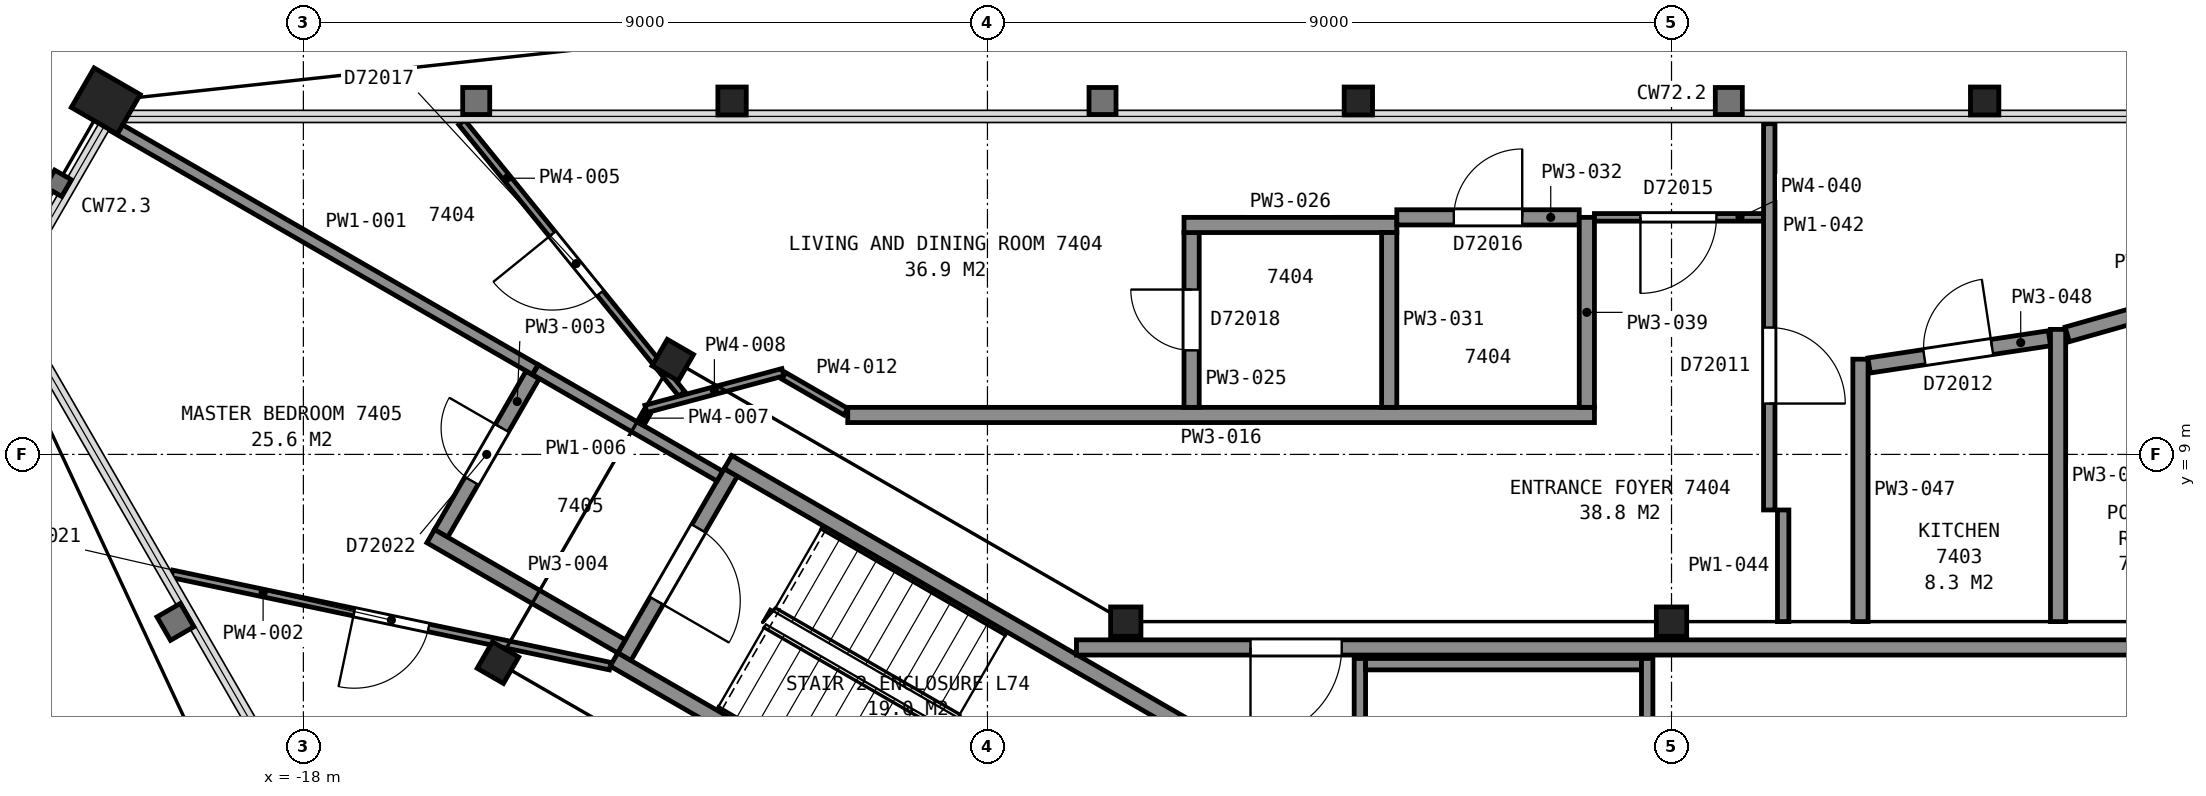
"""IFC4 building model, lengths in metres.
Left out: names, types, materials, properties, quantities, classifications, styles, units other than length and angle.
Written with IfcOpenShell. Run it as: python <this file> out.ifc"""

import sys

from ifc_helpers import new_model, si_unit, direction, frame, frame_2d, origin, origin_2d, place, context, subcontext, project, spatial, rectangle, hollow_rectangle, i_section, extrude, element, fill, save


model = new_model("IFC4")
c1 = context("Model", 3, precision=1e-05, world=origin(), true_north=direction((0.0, 1.0)))
c2 = subcontext(c1, "Body", "Model", "MODEL_VIEW")
j1 = project(units=[si_unit("LENGTHUNIT", "METRE"), si_unit("PLANEANGLEUNIT", "RADIAN")], contexts=[c1])
p1 = place(None, origin())
s1 = spatial("IfcSite", under=j1, at=p1, CompositionType="ELEMENT")
p2 = place(p1, origin())
s2 = spatial("IfcBuilding", under=s1, at=p2, CompositionType="ELEMENT")
p3 = place(p2, frame((0.0, 0.0, 293.6)))
s3 = spatial("IfcBuildingStorey", under=s2, at=p3, CompositionType="ELEMENT", Elevation=293.6)
for number, where, z_axis, x_axis in (
    (1, (4.12, 13.65, 0.0), (0.0, 0.0, 1.0), (1.0, 0.0, 0.0)),
    (2, (-4.12, 13.65, 0.0), (0.0, 0.0, 1.0), (1.0, 0.0, 0.0)),
    (3, (-12.36, 13.65, 0.0), (0.0, 0.0, 1.0), (1.0, 0.0, 0.0)),
):
    element("IfcColumn", number, at=place(p3, frame(where, z_axis=z_axis, x_axis=x_axis)), inside=s3, PredefinedType="COLUMN", context=c2, shape_type="SweptSolid", body=[
        extrude(i_section(OverallWidth=0.373, OverallDepth=0.368, WebThickness=0.015, FlangeThickness=0.024, FilletRadius=0.015, at=origin_2d()), origin(), (0.0, 0.0, 1.0), 3.7),
    ])
p4 = place(p3, frame((-20.6, 13.65, 0.0), z_axis=(0.0, 0.0, 1.0), x_axis=(0.5, 0.866025403784, 0.0)))
e4 = element("IfcColumn", 4, at=p4, inside=s3, PredefinedType="COLUMN", context=c2, shape_type="SweptSolid", body=[
    extrude(hollow_rectangle(XDim=0.6, YDim=0.7, WallThickness=0.04, at=origin_2d()), origin(), (0.0, 0.0, 1.0), 3.7),
])
for number, where, z_axis, x_axis in (
    (5, (0.0, 6.8, 0.0), (0.0, 0.0, 1.0), (1.0, 0.0, 0.0)),
    (6, (-7.18, 6.8, 0.0), (0.0, 0.0, 1.0), (1.0, 0.0, 0.0)),
):
    element("IfcColumn", number, at=place(p3, frame(where, z_axis=z_axis, x_axis=x_axis)), inside=s3, PredefinedType="COLUMN", context=c2, shape_type="SweptSolid", body=[
        extrude(i_section(OverallWidth=0.399, OverallDepth=0.386, WebThickness=0.021, FlangeThickness=0.033, FilletRadius=0.015, at=origin_2d()), origin(), (0.0, 0.0, 1.0), 3.7),
    ])
for number, where, z_axis, x_axis in (
    (7, (-13.14, 10.24, 0.0), (0.0, 0.0, 1.0), (0.5, 0.866, 0.0)),
    (8, (-15.44, 6.26, 0.0), (0.0, 0.0, 1.0), (0.5, 0.866, 0.0)),
):
    element("IfcColumn", number, at=place(p3, frame(where, z_axis=z_axis, x_axis=x_axis)), inside=s3, PredefinedType="COLUMN", context=c2, shape_type="SweptSolid", body=[
        extrude(i_section(OverallWidth=0.401, OverallDepth=0.399, WebThickness=0.025, FlangeThickness=0.04, FilletRadius=0.015, at=origin_2d()), origin(), (0.0, 0.0, 1.0), 3.7),
    ])
p5 = place(p3, frame((-12.377, 8.762, 0.0), z_axis=(0.0, 0.0, 1.0), x_axis=(-0.500049511043, -0.865996816683, 0.0)))
e9 = element("IfcWall", 9, at=p5, inside=s3, PredefinedType="PARTITIONING", context=c2, shape_type="SweptSolid", body=[
    extrude(rectangle(XDim=2.8, YDim=0.2, at=frame_2d((1.4, 0.0))), origin(), (0.0, 0.0, 1.0), 3.45),
])
p6 = place(p5, frame((0.85, 0.0, 0.0)))
e10 = element("IfcOpeningElement", 10, at=p6, cuts=e9, PredefinedType="OPENING", context=c2, shape_type="SweptSolid", body=[
    extrude(rectangle(XDim=1.1, YDim=2.1, at=frame_2d((0.55, 1.05))), frame((0.0, 0.11, 0.0), z_axis=(0.0, -1.0, 0.0), x_axis=(1.0, 0.0, 0.0)), (0.0, 0.0, 1.0), 0.22),
])
for number, where, z_axis, x_axis in (
    (11, (-7.678, 2.701, 0.0), (0.0, 0.0, 1.0), (-0.866, 0.5, 0.0)),
    (12, (-6.178, 5.299, 0.0), (0.0, 0.0, 1.0), (-0.866, 0.5, 0.0)),
):
    element("IfcWall", number, at=place(p3, frame(where, z_axis=z_axis, x_axis=x_axis)), inside=s3, PredefinedType="PARTITIONING", context=c2, shape_type="SweptSolid", body=[
        extrude(rectangle(XDim=7.2, YDim=0.2, at=frame_2d((3.6, 0.0))), origin(), (0.0, 0.0, 1.0), 3.45),
    ])
p7 = place(p3, frame((7.829, 6.46, 0.0), z_axis=(0.0, 0.0, 1.0), x_axis=(-1.0, 0.0, 0.0)))
e13 = element("IfcWall", 13, at=p7, inside=s3, PredefinedType="PARTITIONING", context=c2, shape_type="SweptSolid", body=[
    extrude(rectangle(XDim=15.658, YDim=0.2, at=frame_2d((7.829, 0.0))), origin(), (0.0, 0.0, 1.0), 3.45),
])
p8 = place(p7, frame((12.168, 0.0, 0.0)))
e14 = element("IfcOpeningElement", 14, at=p8, cuts=e13, PredefinedType="OPENING", context=c2, shape_type="SweptSolid", body=[
    extrude(rectangle(XDim=1.2, YDim=2.1, at=frame_2d((0.6, 1.05))), frame((0.0, 0.11, 0.0), z_axis=(0.0, -1.0, 0.0), x_axis=(1.0, 0.0, 0.0)), (0.0, 0.0, 1.0), 0.22),
])
p9 = place(p3, frame((-4.1, 2.085, 0.0), z_axis=(0.0, 0.0, 1.0), x_axis=(0.0, 1.0, 0.0)))
e15 = element("IfcWall", 15, at=p9, inside=s3, PredefinedType="PARTITIONING", context=c2, shape_type="SweptSolid", body=[
    extrude(rectangle(XDim=4.23, YDim=0.15, at=frame_2d((2.115, 0.0))), origin(), (0.0, 0.0, 1.0), 3.45),
])
p10 = place(p9, frame((1.625, 0.0, 0.0)))
e16 = element("IfcOpeningElement", 16, at=p10, cuts=e15, PredefinedType="OPENING", context=c2, shape_type="SweptSolid", body=[
    extrude(rectangle(XDim=1.0, YDim=2.1, at=frame_2d((0.5, 1.05))), frame((0.0, 0.085, 0.0), z_axis=(0.0, -1.0, 0.0), x_axis=(1.0, 0.0, 0.0)), (0.0, 0.0, 1.0), 0.17),
])
p11 = place(p3, frame((-4.025, 6.24, 0.0), z_axis=(0.0, 0.0, 1.0), x_axis=(1.0, 0.0, 0.0)))
e17 = element("IfcWall", 17, at=p11, inside=s3, PredefinedType="PARTITIONING", context=c2, shape_type="SweptSolid", body=[
    extrude(rectangle(XDim=3.63, YDim=0.15, at=frame_2d((1.815, 0.0))), origin(), (0.0, 0.0, 1.0), 3.45),
])
p12 = place(p3, frame((-0.32, 2.252, 0.0), z_axis=(0.0, 0.0, 1.0), x_axis=(0.0, 1.0, 0.0)))
e18 = element("IfcWall", 18, at=p12, inside=s3, PredefinedType="PARTITIONING", context=c2, shape_type="SweptSolid", body=[
    extrude(rectangle(XDim=4.063, YDim=0.15, at=frame_2d((2.031, 0.0))), origin(), (0.0, 0.0, 1.0), 3.45),
])
p13 = place(p3, frame((-20.506, 13.324, 0.0), z_axis=(0.0, 0.0, 1.0), x_axis=(0.866004971522, -0.500035388047, 0.0)))
e19 = element("IfcWall", 19, at=p13, inside=s3, PredefinedType="PARTITIONING", context=c2, shape_type="SweptSolid", body=[
    extrude(rectangle(XDim=6.416, YDim=0.15, at=frame_2d((3.208, 0.0))), origin(), (0.0, 0.0, 1.0), 2.723),
])
p14 = place(p3, frame((-19.729, 7.428, 0.0), z_axis=(0.0, 0.0, 1.0), x_axis=(0.97852427483, -0.206131617102, 0.0)))
e20 = element("IfcWall", 20, at=p14, inside=s3, PredefinedType="PARTITIONING", context=c2, shape_type="SweptSolid", body=[
    extrude(rectangle(XDim=5.891, YDim=0.1, at=frame_2d((2.946, 0.0))), origin(), (0.0, 0.0, 1.0), 2.723),
])
p15 = place(p14, frame((2.45, 0.0, 0.0)))
e21 = element("IfcOpeningElement", 21, at=p15, cuts=e20, PredefinedType="OPENING", context=c2, shape_type="SweptSolid", body=[
    extrude(rectangle(XDim=1.0, YDim=2.1, at=frame_2d((0.5, 1.05))), frame((0.0, 0.06, 0.0), z_axis=(0.0, -1.0, 0.0), x_axis=(1.0, 0.0, 0.0)), (0.0, 0.0, 1.0), 0.12),
])
p16 = place(p3, frame((-14.985, 10.045, 0.0), z_axis=(0.0, 0.0, 1.0), x_axis=(-0.499903970786, -0.866080839178, 0.0)))
e22 = element("IfcWall", 22, at=p16, inside=s3, PredefinedType="PARTITIONING", context=c2, shape_type="SweptSolid", body=[
    extrude(rectangle(XDim=2.406, YDim=0.2, at=frame_2d((1.203, 0.0))), origin(), (0.0, 0.0, 1.0), 2.723),
])
p17 = place(p16, frame((0.806, 0.0, 0.0)))
e23 = element("IfcOpeningElement", 23, at=p17, cuts=e22, PredefinedType="OPENING", context=c2, shape_type="SweptSolid", body=[
    extrude(rectangle(XDim=0.8, YDim=2.1, at=frame_2d((0.4, 1.05))), frame((0.0, 0.11, 0.0), z_axis=(0.0, -1.0, 0.0), x_axis=(1.0, 0.0, 0.0)), (0.0, 0.0, 1.0), 0.22),
])
p18 = place(p3, frame((-16.325, 7.924, 0.0), z_axis=(0.0, 0.0, 1.0), x_axis=(0.865969617579, -0.500096612097, 0.0)))
e24 = element("IfcWall", 24, at=p18, inside=s3, PredefinedType="PARTITIONING", context=c2, shape_type="SweptSolid", body=[
    extrude(rectangle(XDim=2.899, YDim=0.2, at=frame_2d((1.45, 0.0))), origin(), (0.0, 0.0, 1.0), 2.723),
])
p19 = place(p3, frame((-13.021, 9.797, 0.0), z_axis=(0.0, 0.0, 1.0), x_axis=(-0.629738754572, 0.776806990822, 0.0)))
e25 = element("IfcWall", 25, at=p19, inside=s3, PredefinedType="PARTITIONING", context=c2, shape_type="SweptSolid", body=[
    extrude(rectangle(XDim=4.598, YDim=0.1, at=frame_2d((2.299, 0.0))), origin(), (0.0, 0.0, 1.0), 2.723),
])
p20 = place(p19, frame((1.706, 0.0, 0.0)))
e26 = element("IfcOpeningElement", 26, at=p20, cuts=e25, PredefinedType="OPENING", context=c2, shape_type="SweptSolid", body=[
    extrude(rectangle(XDim=1.0, YDim=2.1, at=frame_2d((0.5, 1.05))), frame((0.0, 0.06, 0.0), z_axis=(0.0, -1.0, 0.0), x_axis=(1.0, 0.0, 0.0)), (0.0, 0.0, 1.0), 0.12),
])
p21 = place(p3, frame((-14.945, 10.114, 0.0), z_axis=(0.0, 0.0, 1.0), x_axis=(0.865969158485, -0.500097407065, 0.0)))
e27 = element("IfcWall", 27, at=p21, inside=s3, PredefinedType="PARTITIONING", context=c2, shape_type="SweptSolid", body=[
    extrude(rectangle(XDim=2.799, YDim=0.15, at=frame_2d((1.4, 0.0))), origin(), (0.0, 0.0, 1.0), 2.723),
])
p22 = place(p3, frame((-13.565, 9.404, 0.0), z_axis=(0.0, 0.0, 1.0), x_axis=(0.500181256421, 0.865920730047, 0.0)))
e28 = element("IfcWall", 28, at=p22, inside=s3, PredefinedType="PARTITIONING", context=c2, shape_type="SweptSolid", body=[
    extrude(rectangle(XDim=0.169, YDim=0.1, at=frame_2d((0.084, 0.0))), origin(), (0.0, 0.0, 1.0), 2.723),
])
p23 = place(p3, frame((-13.494, 9.598, 0.0), z_axis=(0.0, 0.0, 1.0), x_axis=(0.96601104623, 0.258500790254, 0.0)))
e29 = element("IfcWall", 29, at=p23, inside=s3, PredefinedType="PARTITIONING", context=c2, shape_type="SweptSolid", body=[
    extrude(rectangle(XDim=1.867, YDim=0.1, at=frame_2d((0.934, 0.0))), origin(), (0.0, 0.0, 1.0), 2.723),
])
p24 = place(p3, frame((-11.678, 10.033, 0.0), z_axis=(0.0, 0.0, 1.0), x_axis=(0.866116627388, -0.499841962787, 0.0)))
e30 = element("IfcWall", 30, at=p24, inside=s3, PredefinedType="PARTITIONING", context=c2, shape_type="SweptSolid", body=[
    extrude(rectangle(XDim=0.943, YDim=0.1, at=frame_2d((0.472, 0.0))), origin(), (0.0, 0.0, 1.0), 2.723),
])
p25 = place(p3, frame((-10.838, 9.519, 0.0), z_axis=(0.0, 0.0, 1.0), x_axis=(1.0, 0.0, 0.0)))
e31 = element("IfcWall", 31, at=p25, inside=s3, PredefinedType="PARTITIONING", context=c2, shape_type="SweptSolid", body=[
    extrude(rectangle(XDim=9.824, YDim=0.2, at=frame_2d((4.912, 0.0))), origin(), (0.0, 0.0, 1.0), 2.723),
])
p26 = place(p3, frame((-6.314, 11.919, 0.0), z_axis=(0.0, 0.0, 1.0), x_axis=(0.0, -1.0, 0.0)))
e32 = element("IfcWall", 32, at=p26, inside=s3, PredefinedType="PARTITIONING", context=c2, shape_type="SweptSolid", body=[
    extrude(rectangle(XDim=2.3, YDim=0.2, at=frame_2d((1.15, 0.0))), origin(), (0.0, 0.0, 1.0), 2.723),
])
p27 = place(p26, frame((0.75, 0.0, 0.0)))
e33 = element("IfcOpeningElement", 33, at=p27, cuts=e32, PredefinedType="OPENING", context=c2, shape_type="SweptSolid", body=[
    extrude(rectangle(XDim=0.8, YDim=2.1, at=frame_2d((0.4, 1.05))), frame((0.0, 0.11, 0.0), z_axis=(0.0, -1.0, 0.0), x_axis=(1.0, 0.0, 0.0)), (0.0, 0.0, 1.0), 0.22),
])
p28 = place(p3, frame((-6.414, 12.019, 0.0), z_axis=(0.0, 0.0, 1.0), x_axis=(1.0, 0.0, 0.0)))
e34 = element("IfcWall", 34, at=p28, inside=s3, PredefinedType="PARTITIONING", context=c2, shape_type="SweptSolid", body=[
    extrude(rectangle(XDim=2.8, YDim=0.2, at=frame_2d((1.4, 0.0))), origin(), (0.0, 0.0, 1.0), 2.723),
])
p29 = place(p3, frame((-3.714, 9.619, 0.0), z_axis=(0.0, 0.0, 1.0), x_axis=(0.0, 1.0, 0.0)))
e35 = element("IfcWall", 35, at=p29, inside=s3, PredefinedType="PARTITIONING", context=c2, shape_type="SweptSolid", body=[
    extrude(rectangle(XDim=2.3, YDim=0.2, at=frame_2d((1.15, 0.0))), origin(), (0.0, 0.0, 1.0), 2.723),
])
p30 = place(p3, frame((-1.214, 12.119, 0.0), z_axis=(0.0, 0.0, 1.0), x_axis=(-1.0, 0.0, 0.0)))
e36 = element("IfcWall", 36, at=p30, inside=s3, PredefinedType="PARTITIONING", context=c2, shape_type="SweptSolid", body=[
    extrude(rectangle(XDim=2.4, YDim=0.2, at=frame_2d((1.2, 0.0))), origin(), (0.0, 0.0, 1.0), 2.723),
])
p31 = place(p30, frame((0.75, 0.0, 0.0)))
e37 = element("IfcOpeningElement", 37, at=p31, cuts=e36, PredefinedType="OPENING", context=c2, shape_type="SweptSolid", body=[
    extrude(rectangle(XDim=0.9, YDim=2.1, at=frame_2d((0.45, 1.05))), frame((0.0, 0.11, 0.0), z_axis=(0.0, -1.0, 0.0), x_axis=(1.0, 0.0, 0.0)), (0.0, 0.0, 1.0), 0.22),
])
p32 = place(p3, frame((-1.114, 9.619, 0.0), z_axis=(0.0, 0.0, 1.0), x_axis=(0.0, 1.0, 0.0)))
e38 = element("IfcWall", 38, at=p32, inside=s3, PredefinedType="PARTITIONING", context=c2, shape_type="SweptSolid", body=[
    extrude(rectangle(XDim=2.5, YDim=0.2, at=frame_2d((1.25, 0.0))), origin(), (0.0, 0.0, 1.0), 2.723),
])
p33 = place(p3, frame((-1.014, 12.119, 0.0), z_axis=(0.0, 0.0, 1.0), x_axis=(1.0, 0.0, 0.0)))
e39 = element("IfcWall", 39, at=p33, inside=s3, PredefinedType="PARTITIONING", context=c2, shape_type="SweptSolid", body=[
    extrude(rectangle(XDim=2.225, YDim=0.1, at=frame_2d((1.112, 0.0))), origin(), (0.0, 0.0, 1.0), 2.723),
])
p34 = place(p33, frame((0.605, 0.0, 0.0)))
e40 = element("IfcOpeningElement", 40, at=p34, cuts=e39, PredefinedType="OPENING", context=c2, shape_type="SweptSolid", body=[
    extrude(rectangle(XDim=1.0, YDim=2.1, at=frame_2d((0.5, 1.05))), frame((0.0, 0.06, 0.0), z_axis=(0.0, -1.0, 0.0), x_axis=(1.0, 0.0, 0.0)), (0.0, 0.0, 1.0), 0.12),
])
p35 = place(p3, frame((1.286, 13.351, 0.0), z_axis=(0.0, 0.0, 1.0), x_axis=(0.0, -1.0, 0.0)))
e41 = element("IfcWall", 41, at=p35, inside=s3, PredefinedType="PARTITIONING", context=c2, shape_type="SweptSolid", body=[
    extrude(rectangle(XDim=5.082, YDim=0.15, at=frame_2d((2.541, 0.0))), origin(), (0.0, 0.0, 1.0), 2.723),
])
p36 = place(p35, frame((2.682, 0.0, 0.0)))
e42 = element("IfcOpeningElement", 42, at=p36, cuts=e41, PredefinedType="OPENING", context=c2, shape_type="SweptSolid", body=[
    extrude(rectangle(XDim=1.0, YDim=2.1, at=frame_2d((0.5, 1.05))), frame((0.0, 0.085, 0.0), z_axis=(0.0, -1.0, 0.0), x_axis=(1.0, 0.0, 0.0)), (0.0, 0.0, 1.0), 0.17),
])
p37 = place(p3, frame((1.469, 6.8, 0.0), z_axis=(0.0, 0.0, 1.0), x_axis=(0.0, 1.0, 0.0)))
e43 = element("IfcWall", 43, at=p37, inside=s3, PredefinedType="PARTITIONING", context=c2, shape_type="SweptSolid", body=[
    extrude(rectangle(XDim=1.469, YDim=0.15, at=frame_2d((0.734, 0.0))), origin(), (0.0, 0.0, 1.0), 2.723),
])
p38 = place(p3, frame((2.486, 6.8, 0.0), z_axis=(0.0, 0.0, 1.0), x_axis=(0.0, 1.0, 0.0)))
e44 = element("IfcWall", 44, at=p38, inside=s3, PredefinedType="PARTITIONING", context=c2, shape_type="SweptSolid", body=[
    extrude(rectangle(XDim=3.453, YDim=0.2, at=frame_2d((1.727, 0.0))), origin(), (0.0, 0.0, 1.0), 2.723),
])
p39 = place(p3, frame((4.972, 10.528, 0.0), z_axis=(0.0, 0.0, 1.0), x_axis=(-0.988827119235, -0.149066858374, 0.0)))
e45 = element("IfcWall", 45, at=p39, inside=s3, PredefinedType="PARTITIONING", context=c2, shape_type="SweptSolid", body=[
    extrude(rectangle(XDim=2.399, YDim=0.2, at=frame_2d((1.2, 0.0))), origin(), (0.0, 0.0, 1.0), 2.723),
])
p40 = place(p39, frame((0.764, 0.0, 0.0)))
e46 = element("IfcOpeningElement", 46, at=p40, cuts=e45, PredefinedType="OPENING", context=c2, shape_type="SweptSolid", body=[
    extrude(rectangle(XDim=0.9, YDim=2.1, at=frame_2d((0.45, 1.05))), frame((0.0, 0.11, 0.0), z_axis=(0.0, -1.0, 0.0), x_axis=(1.0, 0.0, 0.0)), (0.0, 0.0, 1.0), 0.22),
])
p41 = place(p3, frame((5.086, 6.8, 0.0), z_axis=(0.0, 0.0, 1.0), x_axis=(0.0, 1.0, 0.0)))
e47 = element("IfcWall", 47, at=p41, inside=s3, PredefinedType="PARTITIONING", context=c2, shape_type="SweptSolid", body=[
    extrude(rectangle(XDim=3.845, YDim=0.2, at=frame_2d((1.922, 0.0))), origin(), (0.0, 0.0, 1.0), 2.723),
])
p42 = place(p3, frame((5.206, 10.579, 0.0), z_axis=(0.0, 0.0, 1.0), x_axis=(0.962043687615, 0.272895480212, 0.0)))
e48 = element("IfcWall", 48, at=p42, inside=s3, PredefinedType="PARTITIONING", context=c2, shape_type="SweptSolid", body=[
    extrude(rectangle(XDim=2.032, YDim=0.2, at=frame_2d((1.016, 0.0))), origin(), (0.0, 0.0, 1.0), 2.723),
])
p43 = place(p6, origin())
e49 = element("IfcDoor", 49, at=p43, inside=s3, OperationType="SINGLE_SWING_RIGHT", PredefinedType="DOOR", context=c2, shape_type="SweptSolid", body=[
    extrude(rectangle(XDim=1.1, YDim=2.1, at=frame_2d((0.55, 1.05))), frame((0.0, 0.025, 0.0), z_axis=(0.0, -1.0, 0.0), x_axis=(1.0, 0.0, 0.0)), (0.0, 0.0, 1.0), 0.05),
])
fill(e10, e49)
p44 = place(p8, origin())
e50 = element("IfcDoor", 50, at=p44, inside=s3, OperationType="SINGLE_SWING_RIGHT", PredefinedType="DOOR", context=c2, shape_type="SweptSolid", body=[
    extrude(rectangle(XDim=1.2, YDim=2.1, at=frame_2d((0.6, 1.05))), frame((0.0, 0.025, 0.0), z_axis=(0.0, -1.0, 0.0), x_axis=(1.0, 0.0, 0.0)), (0.0, 0.0, 1.0), 0.05),
])
fill(e14, e50)
p45 = place(p15, origin())
e51 = element("IfcDoor", 51, at=p45, inside=s3, OperationType="SINGLE_SWING_LEFT", PredefinedType="DOOR", context=c2, shape_type="SweptSolid", body=[
    extrude(rectangle(XDim=1.0, YDim=2.1, at=frame_2d((0.5, 1.05))), frame((0.0, 0.025, 0.0), z_axis=(0.0, -1.0, 0.0), x_axis=(1.0, 0.0, 0.0)), (0.0, 0.0, 1.0), 0.05),
])
fill(e21, e51)
p46 = place(p17, origin())
e52 = element("IfcDoor", 52, at=p46, inside=s3, OperationType="SINGLE_SWING_LEFT", PredefinedType="DOOR", context=c2, shape_type="SweptSolid", body=[
    extrude(rectangle(XDim=0.8, YDim=2.1, at=frame_2d((0.4, 1.05))), frame((0.0, 0.025, 0.0), z_axis=(0.0, -1.0, 0.0), x_axis=(1.0, 0.0, 0.0)), (0.0, 0.0, 1.0), 0.05),
])
fill(e23, e52)
p47 = place(p20, origin())
e53 = element("IfcDoor", 53, at=p47, inside=s3, OperationType="SINGLE_SWING_RIGHT", PredefinedType="DOOR", context=c2, shape_type="SweptSolid", body=[
    extrude(rectangle(XDim=1.0, YDim=2.1, at=frame_2d((0.5, 1.05))), frame((0.0, 0.025, 0.0), z_axis=(0.0, -1.0, 0.0), x_axis=(1.0, 0.0, 0.0)), (0.0, 0.0, 1.0), 0.05),
])
fill(e26, e53)
p48 = place(p27, origin())
e54 = element("IfcDoor", 54, at=p48, inside=s3, OperationType="SINGLE_SWING_LEFT", PredefinedType="DOOR", context=c2, shape_type="SweptSolid", body=[
    extrude(rectangle(XDim=0.8, YDim=2.1, at=frame_2d((0.4, 1.05))), frame((0.0, 0.025, 0.0), z_axis=(0.0, -1.0, 0.0), x_axis=(1.0, 0.0, 0.0)), (0.0, 0.0, 1.0), 0.05),
])
fill(e33, e54)
p49 = place(p31, origin())
e55 = element("IfcDoor", 55, at=p49, inside=s3, OperationType="SINGLE_SWING_LEFT", PredefinedType="DOOR", context=c2, shape_type="SweptSolid", body=[
    extrude(rectangle(XDim=0.9, YDim=2.1, at=frame_2d((0.45, 1.05))), frame((0.0, 0.025, 0.0), z_axis=(0.0, -1.0, 0.0), x_axis=(1.0, 0.0, 0.0)), (0.0, 0.0, 1.0), 0.05),
])
fill(e37, e55)
p50 = place(p34, origin())
e56 = element("IfcDoor", 56, at=p50, inside=s3, OperationType="SINGLE_SWING_LEFT", PredefinedType="DOOR", context=c2, shape_type="SweptSolid", body=[
    extrude(rectangle(XDim=1.0, YDim=2.1, at=frame_2d((0.5, 1.05))), frame((0.0, 0.025, 0.0), z_axis=(0.0, -1.0, 0.0), x_axis=(1.0, 0.0, 0.0)), (0.0, 0.0, 1.0), 0.05),
])
fill(e40, e56)
p51 = place(p36, origin())
e57 = element("IfcDoor", 57, at=p51, inside=s3, OperationType="SINGLE_SWING_RIGHT", PredefinedType="DOOR", context=c2, shape_type="SweptSolid", body=[
    extrude(rectangle(XDim=1.0, YDim=2.1, at=frame_2d((0.5, 1.05))), frame((0.0, 0.025, 0.0), z_axis=(0.0, -1.0, 0.0), x_axis=(1.0, 0.0, 0.0)), (0.0, 0.0, 1.0), 0.05),
])
fill(e42, e57)
p52 = place(p40, origin())
e58 = element("IfcDoor", 58, at=p52, inside=s3, OperationType="SINGLE_SWING_LEFT", PredefinedType="DOOR", context=c2, shape_type="SweptSolid", body=[
    extrude(rectangle(XDim=0.9, YDim=2.1, at=frame_2d((0.45, 1.05))), frame((0.0, 0.025, 0.0), z_axis=(0.0, -1.0, 0.0), x_axis=(1.0, 0.0, 0.0)), (0.0, 0.0, 1.0), 0.05),
])
fill(e46, e58)
save(model, sys.argv[1])
